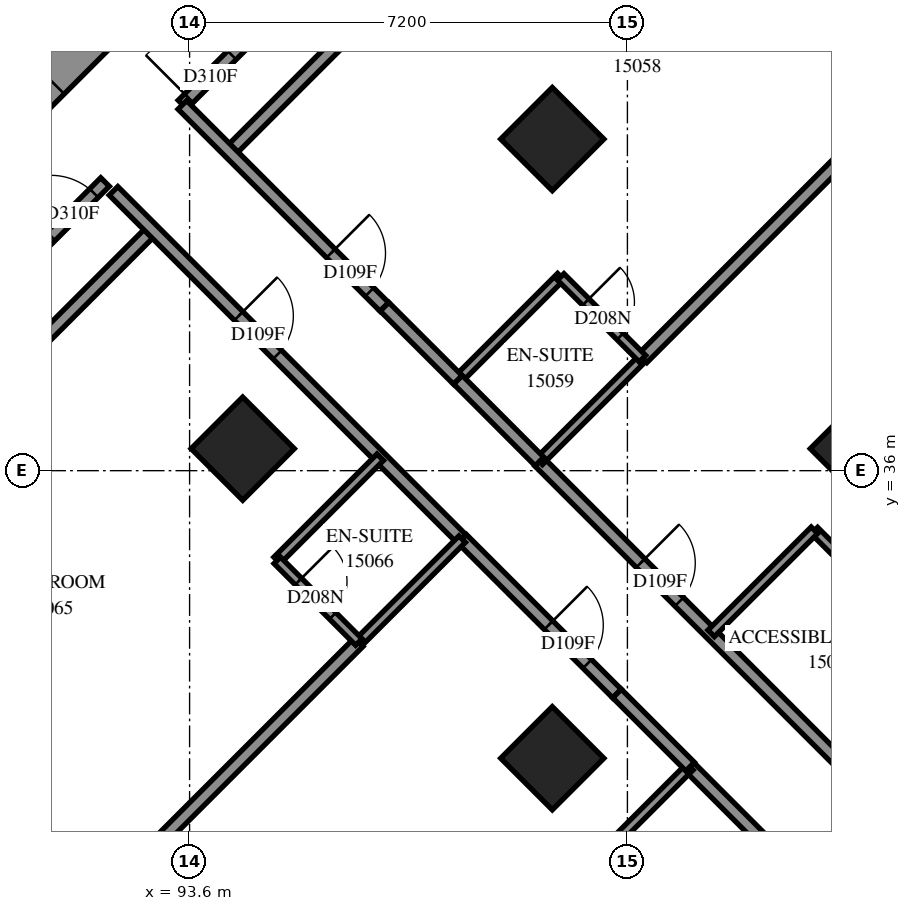
"""IFC4 building model, lengths in metres.
Left out: names, types, materials, properties, quantities, classifications, styles, units other than length and angle.
Written with IfcOpenShell. Run it as: python <this file> out.ifc"""

import sys

from ifc_helpers import new_model, si_unit, direction, frame, frame_2d, origin, origin_2d, place, context, subcontext, project, spatial, polyline, rectangle, outline, extrude, element, fill, save


model = new_model("IFC4")
c1 = context("Model", 3, precision=1e-05, world=origin(), true_north=direction((0.0, 1.0)))
c2 = subcontext(c1, "Body", "Model", "MODEL_VIEW")
j1 = project(units=[si_unit("LENGTHUNIT", "METRE"), si_unit("PLANEANGLEUNIT", "RADIAN")], contexts=[c1])
p1 = place(None, origin())
s1 = spatial("IfcSite", under=j1, at=p1, CompositionType="ELEMENT")
p2 = place(p1, origin())
s2 = spatial("IfcBuilding", under=s1, at=p2, CompositionType="ELEMENT")
p3 = place(p2, frame((0.0, 0.0, 57.6)))
s3 = spatial("IfcBuildingStorey", under=s2, at=p3, CompositionType="ELEMENT", Elevation=57.6)
for number, where, z_axis, x_axis in (
    (1, (99.565, 41.453, 0.0), (0.0, 0.0, 1.0), (0.707, -0.707, 0.0)),
    (2, (94.474, 36.362, 0.0), (0.0, 0.0, 1.0), (0.707, -0.707, 0.0)),
    (3, (104.656, 36.362, 0.0), (0.0, 0.0, 1.0), (0.707, -0.707, 0.0)),
    (4, (99.565, 31.271, 0.0), (0.0, 0.0, 1.0), (0.707, -0.707, 0.0)),
):
    element("IfcColumn", number, at=place(p3, frame(where, z_axis=z_axis, x_axis=x_axis)), inside=s3, PredefinedType="COLUMN", context=c2, shape_type="SweptSolid", body=[
        extrude(rectangle(XDim=1.2, YDim=1.2, at=origin_2d()), origin(), (0.0, 0.0, 1.0), 3.1),
    ])
p4 = place(p3, frame((87.19, 38.554, -0.3), z_axis=(0.0, 0.0, 1.0), x_axis=(0.707103309, 0.7071102534, 0.0)))
e5 = element("IfcWall", 5, at=p4, inside=s3, PredefinedType="SHEAR", context=c2, shape_type="SweptSolid", body=[
    extrude(rectangle(XDim=14.4, YDim=1.0, at=frame_2d((7.2, 0.0))), origin(), (0.0, 0.0, 1.0), 2.7),
])
p5 = place(p4, frame((4.55, 0.0, 0.3)))
e6 = element("IfcOpeningElement", 6, at=p5, cuts=e5, PredefinedType="OPENING", context=c2, shape_type="SweptSolid", body=[
    extrude(rectangle(XDim=1.1, YDim=2.1, at=frame_2d((0.55, 1.05))), frame((0.0, 0.51, 0.0), z_axis=(0.0, -1.0, 0.0), x_axis=(1.0, 0.0, 0.0)), (0.0, 0.0, 1.0), 1.02),
])
p6 = place(p4, frame((11.35, 0.0, 0.3)))
e7 = element("IfcOpeningElement", 7, at=p6, cuts=e5, PredefinedType="OPENING", context=c2, shape_type="SweptSolid", body=[
    extrude(rectangle(XDim=1.1, YDim=2.1, at=frame_2d((0.55, 1.05))), frame((0.0, 0.51, 0.0), z_axis=(0.0, -1.0, 0.0), x_axis=(1.0, 0.0, 0.0)), (0.0, 0.0, 1.0), 1.02),
])
p7 = place(p3, frame((88.034, 30.506, 0.0), z_axis=(0.0, 0.0, 1.0), x_axis=(0.8029298561, -0.5960735241, 0.0)))
e8 = element("IfcWall", 8, at=p7, inside=s3, PredefinedType="SOLIDWALL", context=c2, shape_type="SweptSolid", body=[
    extrude(outline(polyline([(-0.041, -0.275), (3.87, -0.275), (3.951, 0.275), (0.041, 0.275), (-0.041, -0.275)])), origin(), (0.0, 0.0, 1.0), 3.1),
])
p8 = place(p7, frame((0.664, 0.0, 0.5)))
e9 = element("IfcOpeningElement", 9, at=p8, cuts=e8, PredefinedType="OPENING", context=c2, shape_type="SweptSolid", body=[
    extrude(rectangle(XDim=2.8, YDim=2.45, at=frame_2d((1.4, 1.225))), frame((0.0, 0.285, 0.0), z_axis=(0.0, -1.0, 0.0), x_axis=(1.0, 0.0, 0.0)), (0.0, 0.0, 1.0), 0.57),
])
p9 = place(p3, frame((101.825, 31.125, 0.0), z_axis=(0.0, 0.0, 1.0), x_axis=(0.7071067812, -0.7071067812, 0.0)))
e10 = element("IfcWall", 10, at=p9, inside=s3, PredefinedType="PARTITIONING", context=c2, shape_type="SweptSolid", body=[
    extrude(rectangle(XDim=12.7, YDim=0.2, at=frame_2d((6.35, 0.0))), origin(), (0.0, 0.0, 1.0), 3.1),
])
p10 = place(p9, frame((3.895, 0.0, 0.0)))
e11 = element("IfcOpeningElement", 11, at=p10, cuts=e10, PredefinedType="OPENING", context=c2, shape_type="SweptSolid", body=[
    extrude(rectangle(XDim=0.9, YDim=2.1, at=frame_2d((0.45, 1.05))), frame((0.0, 0.11, 0.0), z_axis=(0.0, -1.0, 0.0), x_axis=(1.0, 0.0, 0.0)), (0.0, 0.0, 1.0), 0.22),
])
p11 = place(p9, frame((9.056, 0.0, 0.0)))
e12 = element("IfcOpeningElement", 12, at=p11, cuts=e10, PredefinedType="OPENING", context=c2, shape_type="SweptSolid", body=[
    extrude(rectangle(XDim=1.0, YDim=2.1, at=frame_2d((0.5, 1.05))), frame((0.0, 0.11, 0.0), z_axis=(0.0, -1.0, 0.0), x_axis=(1.0, 0.0, 0.0)), (0.0, 0.0, 1.0), 0.22),
])
p12 = place(p3, frame((94.259, 41.243, 0.0), z_axis=(0.0, 0.0, 1.0), x_axis=(0.7070203602, 0.7071931916, 0.0)))
e13 = element("IfcWall", 13, at=p12, inside=s3, PredefinedType="PARTITIONING", context=c2, shape_type="SweptSolid", body=[
    extrude(rectangle(XDim=12.151, YDim=0.2, at=frame_2d((6.075, 0.0))), origin(), (0.0, 0.0, 1.0), 3.1),
])
p13 = place(p3, frame((93.484, 42.02, 0.0), z_axis=(0.0, 0.0, 1.0), x_axis=(0.7071067812, 0.7071067812, 0.0)))
e14 = element("IfcWall", 14, at=p13, inside=s3, PredefinedType="PARTITIONING", context=c2, shape_type="SweptSolid", body=[
    extrude(rectangle(XDim=9.998, YDim=0.2, at=frame_2d((4.999, 0.0))), origin(), (0.0, 0.0, 1.0), 3.1),
])
p14 = place(p13, frame((0.148, 0.0, 0.0)))
e15 = element("IfcOpeningElement", 15, at=p14, cuts=e14, PredefinedType="OPENING", context=c2, shape_type="SweptSolid", body=[
    extrude(rectangle(XDim=1.0, YDim=2.1, at=frame_2d((0.5, 1.05))), frame((0.0, 0.11, 0.0), z_axis=(0.0, -1.0, 0.0), x_axis=(1.0, 0.0, 0.0)), (0.0, 0.0, 1.0), 0.22),
])
p15 = place(p3, frame((101.049, 37.847, 0.0), z_axis=(0.0, 0.0, 1.0), x_axis=(0.7071067812, 0.7071067812, 0.0)))
e16 = element("IfcWall", 16, at=p15, inside=s3, PredefinedType="PARTITIONING", context=c2, shape_type="SweptSolid", body=[
    extrude(rectangle(XDim=9.806, YDim=0.2, at=frame_2d((4.903, 0.0))), origin(), (0.0, 0.0, 1.0), 3.1),
])
p16 = place(p3, frame((86.314, 33.285, 0.0), z_axis=(0.0, 0.0, 1.0), x_axis=(0.7069956063, 0.7072179386, 0.0)))
e17 = element("IfcWall", 17, at=p16, inside=s3, PredefinedType="PARTITIONING", context=c2, shape_type="SweptSolid", body=[
    extrude(rectangle(XDim=9.445, YDim=0.2, at=frame_2d((4.723, 0.0))), origin(), (0.0, 0.0, 1.0), 3.1),
])
p17 = place(p3, frame((92.349, 40.601, 0.0), z_axis=(0.0, 0.0, 1.0), x_axis=(0.7071067812, -0.7071067812, 0.0)))
e18 = element("IfcWall", 18, at=p17, inside=s3, PredefinedType="PARTITIONING", context=c2, shape_type="SweptSolid", body=[
    extrude(rectangle(XDim=8.101, YDim=0.2, at=frame_2d((4.05, 0.0))), origin(), (0.0, 0.0, 1.0), 3.1),
])
p18 = place(p17, frame((2.909, 0.0, 0.0)))
e19 = element("IfcOpeningElement", 19, at=p18, cuts=e18, PredefinedType="OPENING", context=c2, shape_type="SweptSolid", body=[
    extrude(rectangle(XDim=0.9, YDim=2.1, at=frame_2d((0.45, 1.05))), frame((0.0, 0.11, 0.0), z_axis=(0.0, -1.0, 0.0), x_axis=(1.0, 0.0, 0.0)), (0.0, 0.0, 1.0), 0.22),
])
p19 = place(p3, frame((86.836, 35.372, 0.0), z_axis=(0.0, 0.0, 1.0), x_axis=(0.7071067812, 0.7071067812, 0.0)))
e20 = element("IfcWall", 20, at=p19, inside=s3, PredefinedType="PARTITIONING", context=c2, shape_type="SweptSolid", body=[
    extrude(rectangle(XDim=7.6, YDim=0.2, at=frame_2d((3.8, 0.0))), origin(), (0.0, 0.0, 1.0), 3.1),
])
p20 = place(p19, frame((6.342, 0.0, 0.0)))
e21 = element("IfcOpeningElement", 21, at=p20, cuts=e20, PredefinedType="OPENING", context=c2, shape_type="SweptSolid", body=[
    extrude(rectangle(XDim=1.0, YDim=2.1, at=frame_2d((0.5, 1.05))), frame((0.0, 0.11, 0.0), z_axis=(0.0, -1.0, 0.0), x_axis=(1.0, 0.0, 0.0)), (0.0, 0.0, 1.0), 0.22),
])
p21 = place(p3, frame((99.349, 36.147, 0.0), z_axis=(0.0, 0.0, 1.0), x_axis=(0.7071067812, -0.7071067812, 0.0)))
e22 = element("IfcWall", 22, at=p21, inside=s3, PredefinedType="PARTITIONING", context=c2, shape_type="SweptSolid", body=[
    extrude(rectangle(XDim=7.201, YDim=0.2, at=frame_2d((3.601, 0.0))), origin(), (0.0, 0.0, 1.0), 3.1),
])
p22 = place(p21, frame((2.358, 0.0, 0.0)))
e23 = element("IfcOpeningElement", 23, at=p22, cuts=e22, PredefinedType="OPENING", context=c2, shape_type="SweptSolid", body=[
    extrude(rectangle(XDim=0.9, YDim=2.1, at=frame_2d((0.45, 1.05))), frame((0.0, 0.11, 0.0), z_axis=(0.0, -1.0, 0.0), x_axis=(1.0, 0.0, 0.0)), (0.0, 0.0, 1.0), 0.22),
])
p23 = place(p3, frame((91.457, 28.256, 0.0), z_axis=(0.0, 0.0, 1.0), x_axis=(0.7071067812, 0.7071067812, 0.0)))
e24 = element("IfcWall", 24, at=p23, inside=s3, PredefinedType="PARTITIONING", context=c2, shape_type="SweptSolid", body=[
    extrude(rectangle(XDim=6.965, YDim=0.2, at=frame_2d((3.482, 0.0))), origin(), (0.0, 0.0, 1.0), 3.1),
])
p24 = place(p3, frame((93.481, 42.015, 0.0), z_axis=(0.0, 0.0, 1.0), x_axis=(0.7071067812, -0.7071067812, 0.0)))
e25 = element("IfcWall", 25, at=p24, inside=s3, PredefinedType="PARTITIONING", context=c2, shape_type="SweptSolid", body=[
    extrude(rectangle(XDim=4.698, YDim=0.2, at=frame_2d((2.349, 0.0))), origin(), (0.0, 0.0, 1.0), 3.1),
])
p25 = place(p24, frame((3.452, 0.0, 0.0)))
e26 = element("IfcOpeningElement", 26, at=p25, cuts=e25, PredefinedType="OPENING", context=c2, shape_type="SweptSolid", body=[
    extrude(rectangle(XDim=0.9, YDim=2.1, at=frame_2d((0.45, 1.05))), frame((0.0, 0.11, 0.0), z_axis=(0.0, -1.0, 0.0), x_axis=(1.0, 0.0, 0.0)), (0.0, 0.0, 1.0), 0.22),
])
p26 = place(p3, frame((98.082, 34.879, 0.0), z_axis=(0.0, 0.0, 1.0), x_axis=(0.7073845681, -0.7068288851, 0.0)))
e27 = element("IfcWall", 27, at=p26, inside=s3, PredefinedType="PARTITIONING", context=c2, shape_type="SweptSolid", body=[
    extrude(rectangle(XDim=3.599, YDim=0.2, at=frame_2d((1.8, 0.0))), origin(), (0.0, 0.0, 1.0), 3.1),
])
p27 = place(p26, frame((2.009, 0.0, 0.0)))
e28 = element("IfcOpeningElement", 28, at=p27, cuts=e27, PredefinedType="OPENING", context=c2, shape_type="SweptSolid", body=[
    extrude(rectangle(XDim=0.9, YDim=2.1, at=frame_2d((0.45, 1.05))), frame((0.0, 0.11, 0.0), z_axis=(0.0, -1.0, 0.0), x_axis=(1.0, 0.0, 0.0)), (0.0, 0.0, 1.0), 0.22),
])
p28 = place(p3, frame((103.875, 35.015, 0.0), z_axis=(0.0, 0.0, 1.0), x_axis=(0.7071067812, -0.7071067812, 0.0)))
e29 = element("IfcWall", 29, at=p28, inside=s3, PredefinedType="PARTITIONING", context=c2, shape_type="SweptSolid", body=[
    extrude(rectangle(XDim=3.199, YDim=0.15, at=frame_2d((1.599, 0.0))), origin(), (0.0, 0.0, 1.0), 3.1),
])
p29 = place(p28, frame((1.27, 0.0, 0.0)))
e30 = element("IfcOpeningElement", 30, at=p29, cuts=e29, PredefinedType="OPENING", context=c2, shape_type="SweptSolid", body=[
    extrude(rectangle(XDim=0.8, YDim=2.1, at=frame_2d((0.4, 1.05))), frame((0.0, 0.085, 0.0), z_axis=(0.0, -1.0, 0.0), x_axis=(1.0, 0.0, 0.0)), (0.0, 0.0, 1.0), 0.17),
])
p30 = place(p3, frame((100.129, 29.433, 0.0), z_axis=(0.0, 0.0, 1.0), x_axis=(0.7071067812, 0.7071067812, 0.0)))
e31 = element("IfcWall", 31, at=p30, inside=s3, PredefinedType="PARTITIONING", context=c2, shape_type="SweptSolid", body=[
    extrude(rectangle(XDim=2.401, YDim=0.15, at=frame_2d((1.201, 0.0))), origin(), (0.0, 0.0, 1.0), 3.1),
])
for number, where, z_axis, x_axis in (
    (32, (96.384, 33.178, 0.0), (0.0, 0.0, 1.0), (0.708, 0.707, 0.0)),
    (33, (99.349, 36.153, 0.0), (0.0, 0.0, 1.0), (0.708, 0.707, 0.0)),
    (34, (102.177, 33.325, 0.0), (0.0, 0.0, 1.0), (0.708, 0.707, 0.0)),
):
    element("IfcWall", number, at=place(p3, frame(where, z_axis=z_axis, x_axis=x_axis)), inside=s3, PredefinedType="PARTITIONING", context=c2, shape_type="SweptSolid", body=[
        extrude(rectangle(XDim=2.4, YDim=0.15, at=frame_2d((1.2, 0.0))), origin(), (0.0, 0.0, 1.0), 3.1),
    ])
for number, where, z_axis, x_axis in (
    (35, (95.039, 34.525, 0.0), (0.0, 0.0, 1.0), (0.707, 0.707, 0.0)),
    (36, (98.009, 37.495, 0.0), (0.0, 0.0, 1.0), (0.707, 0.707, 0.0)),
):
    element("IfcWall", number, at=place(p3, frame(where, z_axis=z_axis, x_axis=x_axis)), inside=s3, PredefinedType="PARTITIONING", context=c2, shape_type="SweptSolid", body=[
        extrude(rectangle(XDim=2.398, YDim=0.15, at=frame_2d((1.199, 0.0))), origin(), (0.0, 0.0, 1.0), 3.1),
    ])
p31 = place(p3, frame((99.703, 39.187, 0.0), z_axis=(0.0, 0.0, 1.0), x_axis=(0.7071067812, -0.7071067812, 0.0)))
e37 = element("IfcWall", 37, at=p31, inside=s3, PredefinedType="PARTITIONING", context=c2, shape_type="SweptSolid", body=[
    extrude(rectangle(XDim=1.901, YDim=0.15, at=frame_2d((0.95, 0.0))), origin(), (0.0, 0.0, 1.0), 3.1),
])
p32 = place(p31, frame((0.584, 0.0, 0.0)))
e38 = element("IfcOpeningElement", 38, at=p32, cuts=e37, PredefinedType="OPENING", context=c2, shape_type="SweptSolid", body=[
    extrude(rectangle(XDim=0.8, YDim=2.1, at=frame_2d((0.4, 1.05))), frame((0.0, 0.085, 0.0), z_axis=(0.0, -1.0, 0.0), x_axis=(1.0, 0.0, 0.0)), (0.0, 0.0, 1.0), 0.17),
])
p33 = place(p3, frame((98.012, 37.496, 0.0), z_axis=(0.0, 0.0, 1.0), x_axis=(0.7065800724, -0.7076330979, 0.0)))
e39 = element("IfcWall", 39, at=p33, inside=s3, PredefinedType="PARTITIONING", context=c2, shape_type="SweptSolid", body=[
    extrude(rectangle(XDim=1.899, YDim=0.2, at=frame_2d((0.95, 0.0))), origin(), (0.0, 0.0, 1.0), 3.1),
])
p34 = place(p3, frame((95.042, 34.526, 0.0), z_axis=(0.0, 0.0, 1.0), x_axis=(0.7065800724, -0.7076330979, 0.0)))
e40 = element("IfcWall", 40, at=p34, inside=s3, PredefinedType="PARTITIONING", context=c2, shape_type="SweptSolid", body=[
    extrude(rectangle(XDim=1.899, YDim=0.15, at=frame_2d((0.95, 0.0))), origin(), (0.0, 0.0, 1.0), 3.1),
])
p35 = place(p34, frame((0.491, 0.0, 0.0)))
e41 = element("IfcOpeningElement", 41, at=p35, cuts=e40, PredefinedType="OPENING", context=c2, shape_type="SweptSolid", body=[
    extrude(rectangle(XDim=0.8, YDim=2.1, at=frame_2d((0.4, 1.05))), frame((0.0, 0.085, 0.0), z_axis=(0.0, -1.0, 0.0), x_axis=(1.0, 0.0, 0.0)), (0.0, 0.0, 1.0), 0.17),
])
p36 = place(p3, frame((96.806, 38.696, 0.0), z_axis=(0.0, 0.0, 1.0), x_axis=(0.7076943229, -0.7065187509, 0.0)))
e42 = element("IfcWall", 42, at=p36, inside=s3, PredefinedType="PARTITIONING", context=c2, shape_type="SweptSolid", body=[
    extrude(rectangle(XDim=1.701, YDim=0.2, at=frame_2d((0.851, 0.0))), origin(), (0.0, 0.0, 1.0), 3.1),
])
p37 = place(p3, frame((100.629, 32.335, 0.0), z_axis=(0.0, 0.0, 1.0), x_axis=(0.7071067812, -0.7071067812, 0.0)))
e43 = element("IfcWall", 43, at=p37, inside=s3, PredefinedType="PARTITIONING", context=c2, shape_type="SweptSolid", body=[
    extrude(rectangle(XDim=1.7, YDim=0.2, at=frame_2d((0.85, 0.0))), origin(), (0.0, 0.0, 1.0), 3.1),
])
p38 = place(p14, origin())
e44 = element("IfcDoor", 44, at=p38, inside=s3, OperationType="SINGLE_SWING_LEFT", PredefinedType="DOOR", context=c2, shape_type="SweptSolid", body=[
    extrude(rectangle(XDim=1.0, YDim=2.1, at=frame_2d((0.5, 1.05))), frame((0.0, 0.025, 0.0), z_axis=(0.0, -1.0, 0.0), x_axis=(1.0, 0.0, 0.0)), (0.0, 0.0, 1.0), 0.05),
])
fill(e15, e44)
p39 = place(p25, origin())
e45 = element("IfcDoor", 45, at=p39, inside=s3, OperationType="SINGLE_SWING_RIGHT", PredefinedType="DOOR", context=c2, shape_type="SweptSolid", body=[
    extrude(rectangle(XDim=0.9, YDim=2.1, at=frame_2d((0.45, 1.05))), frame((0.0, 0.025, 0.0), z_axis=(0.0, -1.0, 0.0), x_axis=(1.0, 0.0, 0.0)), (0.0, 0.0, 1.0), 0.05),
])
fill(e26, e45)
p40 = place(p32, origin())
e46 = element("IfcDoor", 46, at=p40, inside=s3, OperationType="SINGLE_SWING_RIGHT", PredefinedType="DOOR", context=c2, shape_type="SweptSolid", body=[
    extrude(rectangle(XDim=0.8, YDim=2.1, at=frame_2d((0.4, 1.05))), frame((0.0, 0.025, 0.0), z_axis=(0.0, -1.0, 0.0), x_axis=(1.0, 0.0, 0.0)), (0.0, 0.0, 1.0), 0.05),
])
fill(e38, e46)
p41 = place(p22, origin())
e47 = element("IfcDoor", 47, at=p41, inside=s3, OperationType="SINGLE_SWING_RIGHT", PredefinedType="DOOR", context=c2, shape_type="SweptSolid", body=[
    extrude(rectangle(XDim=0.9, YDim=2.1, at=frame_2d((0.45, 1.05))), frame((0.0, 0.025, 0.0), z_axis=(0.0, -1.0, 0.0), x_axis=(1.0, 0.0, 0.0)), (0.0, 0.0, 1.0), 0.05),
])
fill(e23, e47)
p42 = place(p20, origin())
e48 = element("IfcDoor", 48, at=p42, inside=s3, OperationType="SINGLE_SWING_RIGHT", PredefinedType="DOOR", context=c2, shape_type="SweptSolid", body=[
    extrude(rectangle(XDim=1.0, YDim=2.1, at=frame_2d((0.5, 1.05))), frame((0.0, 0.025, 0.0), z_axis=(0.0, -1.0, 0.0), x_axis=(1.0, 0.0, 0.0)), (0.0, 0.0, 1.0), 0.05),
])
fill(e21, e48)
p43 = place(p18, origin())
e49 = element("IfcDoor", 49, at=p43, inside=s3, OperationType="SINGLE_SWING_LEFT", PredefinedType="DOOR", context=c2, shape_type="SweptSolid", body=[
    extrude(rectangle(XDim=0.9, YDim=2.1, at=frame_2d((0.45, 1.05))), frame((0.0, 0.025, 0.0), z_axis=(0.0, -1.0, 0.0), x_axis=(1.0, 0.0, 0.0)), (0.0, 0.0, 1.0), 0.05),
])
fill(e19, e49)
p44 = place(p35, origin())
e50 = element("IfcDoor", 50, at=p44, inside=s3, OperationType="SINGLE_SWING_RIGHT", PredefinedType="DOOR", context=c2, shape_type="SweptSolid", body=[
    extrude(rectangle(XDim=0.8, YDim=2.1, at=frame_2d((0.4, 1.05))), frame((0.0, 0.025, 0.0), z_axis=(0.0, -1.0, 0.0), x_axis=(1.0, 0.0, 0.0)), (0.0, 0.0, 1.0), 0.05),
])
fill(e41, e50)
p45 = place(p27, origin())
e51 = element("IfcDoor", 51, at=p45, inside=s3, OperationType="SINGLE_SWING_LEFT", PredefinedType="DOOR", context=c2, shape_type="SweptSolid", body=[
    extrude(rectangle(XDim=0.9, YDim=2.1, at=frame_2d((0.45, 1.05))), frame((0.0, 0.025, 0.0), z_axis=(0.0, -1.0, 0.0), x_axis=(1.0, 0.0, 0.0)), (0.0, 0.0, 1.0), 0.05),
])
fill(e28, e51)
save(model, sys.argv[1])
